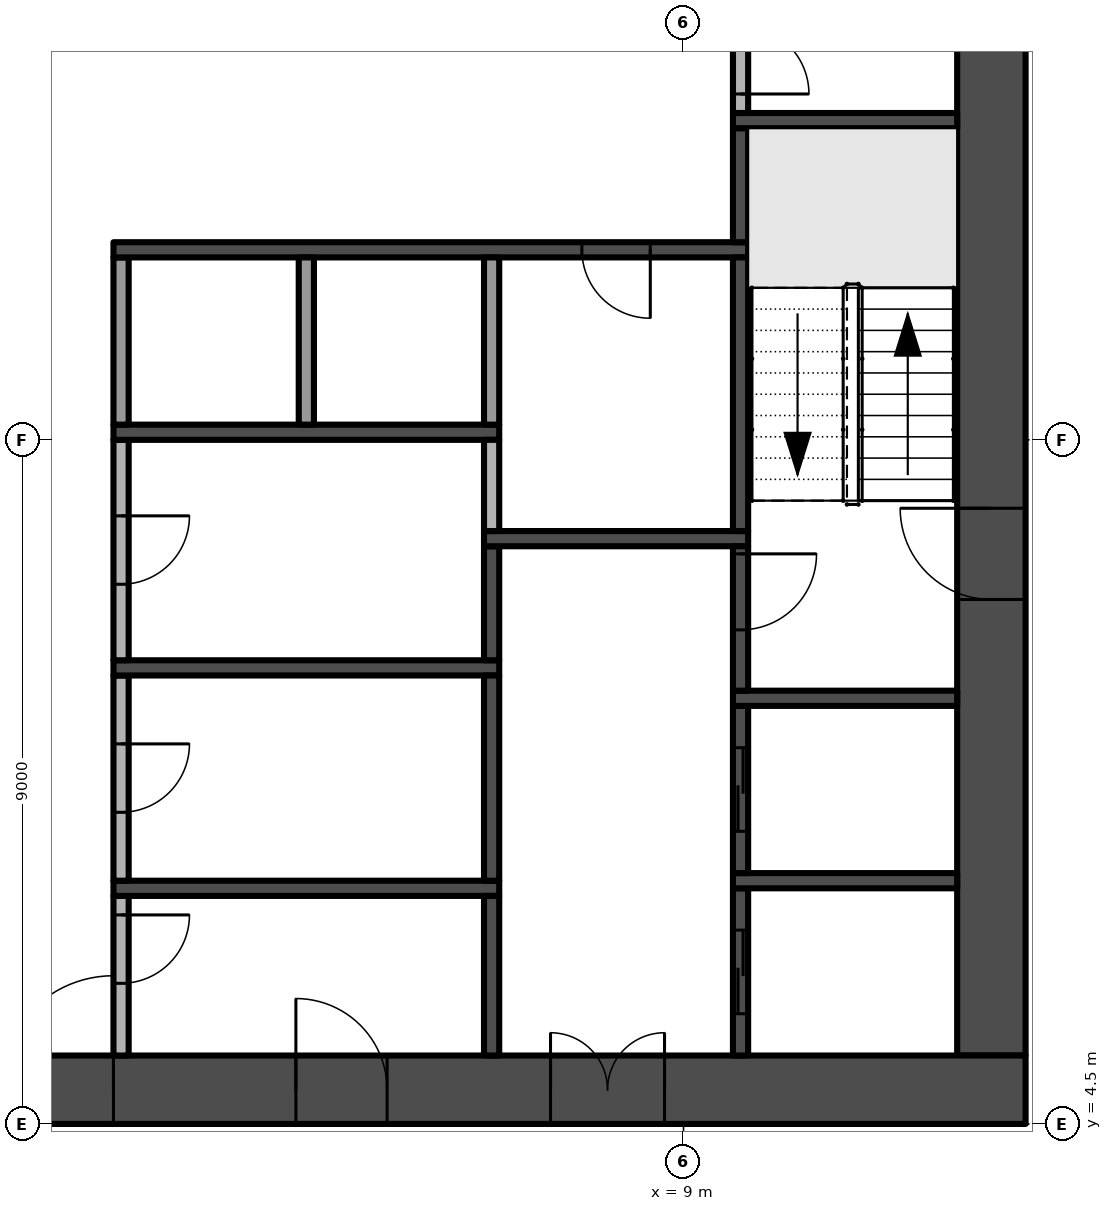
"""IFC4 building model, lengths in metres.
Left out: names, types, materials, properties, quantities, classifications, styles, units other than length and angle.
Written with IfcOpenShell. Run it as: python <this file> out.ifc"""

import sys

from ifc_helpers import new_model, si_unit, direction, frame, frame_2d, origin, place, context, subcontext, project, spatial, rectangle, extrude, element, fill, save


model = new_model("IFC4")
c1 = context("Model", 3, precision=1e-05, world=origin(), true_north=direction((0.0, 1.0)))
c2 = subcontext(c1, "Body", "Model", "MODEL_VIEW")
j1 = project(units=[si_unit("LENGTHUNIT", "METRE"), si_unit("PLANEANGLEUNIT", "RADIAN")], contexts=[c1])
p1 = place(None, origin())
s1 = spatial("IfcSite", under=j1, at=p1, CompositionType="ELEMENT")
p2 = place(p1, origin())
s2 = spatial("IfcBuilding", under=s1, at=p2, CompositionType="ELEMENT")
p3 = place(p2, frame((0.0, 0.0, 80.8)))
s3 = spatial("IfcBuildingStorey", under=s2, at=p3, CompositionType="ELEMENT", Elevation=80.8)
p4 = place(p3, frame((-13.5, 4.95, -0.3), z_axis=(0.0, 0.0, 1.0), x_axis=(1.0, 0.0, 0.0)))
e1 = element("IfcWall", 1, at=p4, inside=s3, PredefinedType="SHEAR", context=c2, shape_type="SweptSolid", body=[
    extrude(rectangle(XDim=27.0, YDim=0.9, at=frame_2d((13.5, 0.0))), origin(), (0.0, 0.0, 1.0), 3.8),
])
p5 = place(p4, frame((12.0, 0.0, 0.3)))
e2 = element("IfcOpeningElement", 2, at=p5, cuts=e1, PredefinedType="OPENING", context=c2, shape_type="SweptSolid", body=[
    extrude(rectangle(XDim=3.0, YDim=2.4, at=frame_2d((1.5, 1.2))), frame((0.0, 0.46, 0.0), z_axis=(0.0, -1.0, 0.0), x_axis=(1.0, 0.0, 0.0)), (0.0, 0.0, 1.0), 0.92),
])
p6 = place(p4, frame((4.9, 0.0, 0.3)))
e3 = element("IfcOpeningElement", 3, at=p6, cuts=e1, PredefinedType="OPENING", context=c2, shape_type="SweptSolid", body=[
    extrude(rectangle(XDim=1.2, YDim=2.2, at=frame_2d((0.6, 1.1))), frame((0.0, 0.46, 0.0), z_axis=(0.0, -1.0, 0.0), x_axis=(1.0, 0.0, 0.0)), (0.0, 0.0, 1.0), 0.92),
])
p7 = place(p4, frame((20.75, 0.0, 0.3)))
e4 = element("IfcOpeningElement", 4, at=p7, cuts=e1, PredefinedType="OPENING", context=c2, shape_type="SweptSolid", body=[
    extrude(rectangle(XDim=1.5, YDim=2.2, at=frame_2d((0.75, 1.1))), frame((0.0, 0.46, 0.0), z_axis=(0.0, -1.0, 0.0), x_axis=(1.0, 0.0, 0.0)), (0.0, 0.0, 1.0), 0.92),
])
p8 = place(p4, frame((17.4, 0.0, 0.3)))
e5 = element("IfcOpeningElement", 5, at=p8, cuts=e1, PredefinedType="OPENING", context=c2, shape_type="SweptSolid", body=[
    extrude(rectangle(XDim=1.2, YDim=2.2, at=frame_2d((0.6, 1.1))), frame((0.0, 0.46, 0.0), z_axis=(0.0, -1.0, 0.0), x_axis=(1.0, 0.0, 0.0)), (0.0, 0.0, 1.0), 0.92),
])
p9 = place(p3, frame((13.05, 5.4, -0.3), z_axis=(0.0, 0.0, 1.0), x_axis=(0.0, 1.0, 0.0)))
e6 = element("IfcWall", 6, at=p9, inside=s3, PredefinedType="SHEAR", context=c2, shape_type="SweptSolid", body=[
    extrude(rectangle(XDim=16.2, YDim=0.9, at=frame_2d((8.1, 0.0))), origin(), (0.0, 0.0, 1.0), 3.8),
])
p10 = place(p9, frame((6.0, 0.0, 0.3)))
e7 = element("IfcOpeningElement", 7, at=p10, cuts=e6, PredefinedType="OPENING", context=c2, shape_type="SweptSolid", body=[
    extrude(rectangle(XDim=1.2, YDim=2.2, at=frame_2d((0.6, 1.1))), frame((0.0, 0.46, 0.0), z_axis=(0.0, -1.0, 0.0), x_axis=(1.0, 0.0, 0.0)), (0.0, 0.0, 1.0), 0.92),
])
p11 = place(p3, frame((1.6, 7.5, 0.0), z_axis=(0.0, 0.0, 1.0), x_axis=(0.0, -1.0, 0.0)))
e8 = element("IfcWall", 8, at=p11, inside=s3, PredefinedType="PARTITIONING", context=c2, shape_type="SweptSolid", body=[
    extrude(rectangle(XDim=2.1, YDim=0.2, at=frame_2d((1.05, 0.0))), origin(), (0.0, 0.0, 1.0), 3.5),
])
p12 = place(p11, frame((0.25, 0.0, 0.0)))
e9 = element("IfcOpeningElement", 9, at=p12, cuts=e8, PredefinedType="OPENING", context=c2, shape_type="SweptSolid", body=[
    extrude(rectangle(XDim=0.9, YDim=2.1, at=frame_2d((0.45, 1.05))), frame((0.0, 0.11, 0.0), z_axis=(0.0, -1.0, 0.0), x_axis=(1.0, 0.0, 0.0)), (0.0, 0.0, 1.0), 0.22),
])
p13 = place(p3, frame((1.5, 7.6, 0.0), z_axis=(0.0, 0.0, 1.0), x_axis=(1.0, 0.0, 0.0)))
e10 = element("IfcWall", 10, at=p13, inside=s3, PredefinedType="SHEAR", context=c2, shape_type="SweptSolid", body=[
    extrude(rectangle(XDim=5.075, YDim=0.2, at=frame_2d((2.538, 0.0))), origin(), (0.0, 0.0, 1.0), 3.5),
])
p14 = place(p3, frame((1.6, 10.4, 0.0), z_axis=(0.0, 0.0, 1.0), x_axis=(0.0, -1.0, 0.0)))
e11 = element("IfcWall", 11, at=p14, inside=s3, PredefinedType="PARTITIONING", context=c2, shape_type="SweptSolid", body=[
    extrude(rectangle(XDim=2.7, YDim=0.2, at=frame_2d((1.35, 0.0))), origin(), (0.0, 0.0, 1.0), 3.5),
])
p15 = place(p14, frame((0.9, 0.0, 0.0)))
e12 = element("IfcOpeningElement", 12, at=p15, cuts=e11, PredefinedType="OPENING", context=c2, shape_type="SweptSolid", body=[
    extrude(rectangle(XDim=0.9, YDim=2.1, at=frame_2d((0.45, 1.05))), frame((0.0, 0.11, 0.0), z_axis=(0.0, -1.0, 0.0), x_axis=(1.0, 0.0, 0.0)), (0.0, 0.0, 1.0), 0.22),
])
p16 = place(p3, frame((1.5, 10.5, 0.0), z_axis=(0.0, 0.0, 1.0), x_axis=(1.0, 0.0, 0.0)))
e13 = element("IfcWall", 13, at=p16, inside=s3, PredefinedType="SHEAR", context=c2, shape_type="SweptSolid", body=[
    extrude(rectangle(XDim=5.075, YDim=0.2, at=frame_2d((2.538, 0.0))), origin(), (0.0, 0.0, 1.0), 3.5),
])
p17 = place(p3, frame((1.6, 13.5, 0.0), z_axis=(0.0, 0.0, 1.0), x_axis=(0.0, -1.0, 0.0)))
e14 = element("IfcWall", 14, at=p17, inside=s3, PredefinedType="PARTITIONING", context=c2, shape_type="SweptSolid", body=[
    extrude(rectangle(XDim=2.9, YDim=0.2, at=frame_2d((1.45, 0.0))), origin(), (0.0, 0.0, 1.0), 3.5),
])
p18 = place(p17, frame((1.0, 0.0, 0.0)))
e15 = element("IfcOpeningElement", 15, at=p18, cuts=e14, PredefinedType="OPENING", context=c2, shape_type="SweptSolid", body=[
    extrude(rectangle(XDim=0.9, YDim=2.1, at=frame_2d((0.45, 1.05))), frame((0.0, 0.11, 0.0), z_axis=(0.0, -1.0, 0.0), x_axis=(1.0, 0.0, 0.0)), (0.0, 0.0, 1.0), 0.22),
])
p19 = place(p3, frame((1.5, 13.6, 0.0), z_axis=(0.0, 0.0, 1.0), x_axis=(1.0, 0.0, 0.0)))
e16 = element("IfcWall", 16, at=p19, inside=s3, PredefinedType="SHEAR", context=c2, shape_type="SweptSolid", body=[
    extrude(rectangle(XDim=5.075, YDim=0.2, at=frame_2d((2.538, 0.0))), origin(), (0.0, 0.0, 1.0), 3.5),
])
p20 = place(p3, frame((1.6, 13.7, 0.0), z_axis=(0.0, 0.0, 1.0), x_axis=(0.0, 1.0, 0.0)))
e17 = element("IfcWall", 17, at=p20, inside=s3, PredefinedType="PARTITIONING", context=c2, shape_type="SweptSolid", body=[
    extrude(rectangle(XDim=2.2, YDim=0.2, at=frame_2d((1.1, 0.0))), origin(), (0.0, 0.0, 1.0), 3.5),
])
p21 = place(p3, frame((9.85, 16.0, 0.0), z_axis=(0.0, 0.0, 1.0), x_axis=(-1.0, 0.0, 0.0)))
e18 = element("IfcWall", 18, at=p21, inside=s3, PredefinedType="SHEAR", context=c2, shape_type="SweptSolid", body=[
    extrude(rectangle(XDim=8.35, YDim=0.2, at=frame_2d((4.175, 0.0))), origin(), (0.0, 0.0, 1.0), 3.5),
])
p22 = place(p21, frame((1.288, 0.0, 0.0)))
e19 = element("IfcOpeningElement", 19, at=p22, cuts=e18, PredefinedType="OPENING", context=c2, shape_type="SweptSolid", body=[
    extrude(rectangle(XDim=0.9, YDim=2.1, at=frame_2d((0.45, 1.05))), frame((0.0, 0.11, 0.0), z_axis=(0.0, -1.0, 0.0), x_axis=(1.0, 0.0, 0.0)), (0.0, 0.0, 1.0), 0.22),
])
p23 = place(p3, frame((4.037, 13.7, 0.0), z_axis=(0.0, 0.0, 1.0), x_axis=(0.0, 1.0, 0.0)))
e20 = element("IfcWall", 20, at=p23, inside=s3, PredefinedType="PARTITIONING", context=c2, shape_type="SweptSolid", body=[
    extrude(rectangle(XDim=2.2, YDim=0.2, at=frame_2d((1.1, 0.0))), origin(), (0.0, 0.0, 1.0), 3.5),
])
p24 = place(p3, frame((6.475, 5.4, 0.0), z_axis=(0.0, 0.0, 1.0), x_axis=(0.0, 1.0, 0.0)))
e21 = element("IfcWall", 21, at=p24, inside=s3, PredefinedType="SHEAR", context=c2, shape_type="SweptSolid", body=[
    extrude(rectangle(XDim=2.1, YDim=0.2, at=frame_2d((1.05, 0.0))), origin(), (0.0, 0.0, 1.0), 3.5),
])
p25 = place(p3, frame((6.475, 7.7, 0.0), z_axis=(0.0, 0.0, 1.0), x_axis=(0.0, 1.0, 0.0)))
e22 = element("IfcWall", 22, at=p25, inside=s3, PredefinedType="SHEAR", context=c2, shape_type="SweptSolid", body=[
    extrude(rectangle(XDim=2.7, YDim=0.2, at=frame_2d((1.35, 0.0))), origin(), (0.0, 0.0, 1.0), 3.5),
])
p26 = place(p3, frame((6.475, 10.6, 0.0), z_axis=(0.0, 0.0, 1.0), x_axis=(0.0, 1.0, 0.0)))
e23 = element("IfcWall", 23, at=p26, inside=s3, PredefinedType="SHEAR", context=c2, shape_type="SweptSolid", body=[
    extrude(rectangle(XDim=1.5, YDim=0.2, at=frame_2d((0.75, 0.0))), origin(), (0.0, 0.0, 1.0), 3.5),
])
p27 = place(p3, frame((6.375, 12.2, 0.0), z_axis=(0.0, 0.0, 1.0), x_axis=(1.0, 0.0, 0.0)))
e24 = element("IfcWall", 24, at=p27, inside=s3, PredefinedType="SHEAR", context=c2, shape_type="SweptSolid", body=[
    extrude(rectangle(XDim=3.475, YDim=0.2, at=frame_2d((1.738, 0.0))), origin(), (0.0, 0.0, 1.0), 3.5),
])
p28 = place(p3, frame((6.475, 12.3, 0.0), z_axis=(0.0, 0.0, 1.0), x_axis=(0.0, 1.0, 0.0)))
e25 = element("IfcWall", 25, at=p28, inside=s3, PredefinedType="PARTITIONING", context=c2, shape_type="SweptSolid", body=[
    extrude(rectangle(XDim=1.2, YDim=0.2, at=frame_2d((0.6, 0.0))), origin(), (0.0, 0.0, 1.0), 3.5),
])
p29 = place(p3, frame((6.475, 13.7, 0.0), z_axis=(0.0, 0.0, 1.0), x_axis=(0.0, 1.0, 0.0)))
e26 = element("IfcWall", 26, at=p29, inside=s3, PredefinedType="PARTITIONING", context=c2, shape_type="SweptSolid", body=[
    extrude(rectangle(XDim=2.2, YDim=0.2, at=frame_2d((1.1, 0.0))), origin(), (0.0, 0.0, 1.0), 3.5),
])
p30 = place(p3, frame((9.75, 5.4, 0.0), z_axis=(0.0, 0.0, 1.0), x_axis=(0.0, 1.0, 0.0)))
e27 = element("IfcWall", 27, at=p30, inside=s3, PredefinedType="SHEAR", context=c2, shape_type="SweptSolid", body=[
    extrude(rectangle(XDim=2.2, YDim=0.2, at=frame_2d((1.1, 0.0))), origin(), (0.0, 0.0, 1.0), 3.5),
])
p31 = place(p30, frame((0.55, 0.0, 0.0)))
e28 = element("IfcOpeningElement", 28, at=p31, cuts=e27, PredefinedType="OPENING", context=c2, shape_type="SweptSolid", body=[
    extrude(rectangle(XDim=1.1, YDim=2.1, at=frame_2d((0.55, 1.05))), frame((0.0, 0.11, 0.0), z_axis=(0.0, -1.0, 0.0), x_axis=(1.0, 0.0, 0.0)), (0.0, 0.0, 1.0), 0.22),
])
p32 = place(p3, frame((9.65, 7.7, 0.0), z_axis=(0.0, 0.0, 1.0), x_axis=(1.0, 0.0, 0.0)))
e29 = element("IfcWall", 29, at=p32, inside=s3, PredefinedType="SHEAR", context=c2, shape_type="SweptSolid", body=[
    extrude(rectangle(XDim=2.95, YDim=0.2, at=frame_2d((1.475, 0.0))), origin(), (0.0, 0.0, 1.0), 3.5),
])
p33 = place(p3, frame((9.75, 7.8, 0.0), z_axis=(0.0, 0.0, 1.0), x_axis=(0.0, 1.0, 0.0)))
e30 = element("IfcWall", 30, at=p33, inside=s3, PredefinedType="SHEAR", context=c2, shape_type="SweptSolid", body=[
    extrude(rectangle(XDim=2.2, YDim=0.2, at=frame_2d((1.1, 0.0))), origin(), (0.0, 0.0, 1.0), 3.5),
])
p34 = place(p33, frame((0.55, 0.0, 0.0)))
e31 = element("IfcOpeningElement", 31, at=p34, cuts=e30, PredefinedType="OPENING", context=c2, shape_type="SweptSolid", body=[
    extrude(rectangle(XDim=1.1, YDim=2.1, at=frame_2d((0.55, 1.05))), frame((0.0, 0.11, 0.0), z_axis=(0.0, -1.0, 0.0), x_axis=(1.0, 0.0, 0.0)), (0.0, 0.0, 1.0), 0.22),
])
p35 = place(p3, frame((9.65, 10.1, 0.0), z_axis=(0.0, 0.0, 1.0), x_axis=(1.0, 0.0, 0.0)))
e32 = element("IfcWall", 32, at=p35, inside=s3, PredefinedType="SHEAR", context=c2, shape_type="SweptSolid", body=[
    extrude(rectangle(XDim=2.95, YDim=0.2, at=frame_2d((1.475, 0.0))), origin(), (0.0, 0.0, 1.0), 3.5),
])
p36 = place(p3, frame((9.75, 12.1, 0.0), z_axis=(0.0, 0.0, 1.0), x_axis=(0.0, -1.0, 0.0)))
e33 = element("IfcWall", 33, at=p36, inside=s3, PredefinedType="SHEAR", context=c2, shape_type="SweptSolid", body=[
    extrude(rectangle(XDim=1.9, YDim=0.2, at=frame_2d((0.95, 0.0))), origin(), (0.0, 0.0, 1.0), 3.5),
])
p37 = place(p36, frame((0.1, 0.0, 0.0)))
e34 = element("IfcOpeningElement", 34, at=p37, cuts=e33, PredefinedType="OPENING", context=c2, shape_type="SweptSolid", body=[
    extrude(rectangle(XDim=1.0, YDim=2.2, at=frame_2d((0.5, 1.1))), frame((0.0, 0.11, 0.0), z_axis=(0.0, -1.0, 0.0), x_axis=(1.0, 0.0, 0.0)), (0.0, 0.0, 1.0), 0.22),
])
p38 = place(p3, frame((9.75, 12.3, 0.0), z_axis=(0.0, 0.0, 1.0), x_axis=(0.0, 1.0, 0.0)))
e35 = element("IfcWall", 35, at=p38, inside=s3, PredefinedType="SHEAR", context=c2, shape_type="SweptSolid", body=[
    extrude(rectangle(XDim=3.6, YDim=0.2, at=frame_2d((1.8, 0.0))), origin(), (0.0, 0.0, 1.0), 3.5),
])
p39 = place(p3, frame((9.75, 16.1, 0.0), z_axis=(0.0, 0.0, 1.0), x_axis=(0.0, 1.0, 0.0)))
e36 = element("IfcWall", 36, at=p39, inside=s3, PredefinedType="SHEAR", context=c2, shape_type="SweptSolid", body=[
    extrude(rectangle(XDim=1.5, YDim=0.2, at=frame_2d((0.75, 0.0))), origin(), (0.0, 0.0, 1.0), 3.5),
])
p40 = place(p3, frame((9.65, 17.7, 0.0), z_axis=(0.0, 0.0, 1.0), x_axis=(1.0, 0.0, 0.0)))
e37 = element("IfcWall", 37, at=p40, inside=s3, PredefinedType="SHEAR", context=c2, shape_type="SweptSolid", body=[
    extrude(rectangle(XDim=2.95, YDim=0.2, at=frame_2d((1.475, 0.0))), origin(), (0.0, 0.0, 1.0), 3.5),
])
p41 = place(p3, frame((9.75, 19.2, 0.0), z_axis=(0.0, 0.0, 1.0), x_axis=(0.0, -1.0, 0.0)))
e38 = element("IfcWall", 38, at=p41, inside=s3, PredefinedType="PARTITIONING", context=c2, shape_type="SweptSolid", body=[
    extrude(rectangle(XDim=1.4, YDim=0.2, at=frame_2d((0.7, 0.0))), origin(), (0.0, 0.0, 1.0), 3.5),
])
p42 = place(p41, frame((0.25, 0.0, 0.0)))
e39 = element("IfcOpeningElement", 39, at=p42, cuts=e38, PredefinedType="OPENING", context=c2, shape_type="SweptSolid", body=[
    extrude(rectangle(XDim=0.9, YDim=2.1, at=frame_2d((0.45, 1.05))), frame((0.0, 0.11, 0.0), z_axis=(0.0, -1.0, 0.0), x_axis=(1.0, 0.0, 0.0)), (0.0, 0.0, 1.0), 0.22),
])
p43 = place(p5, frame((3.0, 0.0, 0.0), z_axis=(0.0, 0.0, 1.0), x_axis=(-1.0, 0.0, 0.0)))
e40 = element("IfcDoor", 40, at=p43, inside=s3, OperationType="DOUBLE_DOOR_SINGLE_SWING", PredefinedType="DOOR", context=c2, shape_type="SweptSolid", body=[
    extrude(rectangle(XDim=3.0, YDim=2.4, at=frame_2d((1.5, 1.2))), frame((0.0, 0.025, 0.0), z_axis=(0.0, -1.0, 0.0), x_axis=(1.0, 0.0, 0.0)), (0.0, 0.0, 1.0), 0.05),
])
fill(e2, e40)
p44 = place(p10, frame((1.2, 0.0, 0.0), z_axis=(0.0, 0.0, 1.0), x_axis=(-1.0, 0.0, 0.0)))
e41 = element("IfcDoor", 41, at=p44, inside=s3, OperationType="SINGLE_SWING_LEFT", PredefinedType="DOOR", context=c2, shape_type="SweptSolid", body=[
    extrude(rectangle(XDim=1.2, YDim=2.2, at=frame_2d((0.6, 1.1))), frame((0.0, 0.025, 0.0), z_axis=(0.0, -1.0, 0.0), x_axis=(1.0, 0.0, 0.0)), (0.0, 0.0, 1.0), 0.05),
])
fill(e7, e41)
p45 = place(p7, frame((1.5, 0.0, 0.0), z_axis=(0.0, 0.0, 1.0), x_axis=(-1.0, 0.0, 0.0)))
e42 = element("IfcDoor", 42, at=p45, inside=s3, OperationType="DOUBLE_DOOR_SINGLE_SWING", PredefinedType="DOOR", context=c2, shape_type="SweptSolid", body=[
    extrude(rectangle(XDim=1.5, YDim=2.2, at=frame_2d((0.75, 1.1))), frame((0.0, 0.025, 0.0), z_axis=(0.0, -1.0, 0.0), x_axis=(1.0, 0.0, 0.0)), (0.0, 0.0, 1.0), 0.05),
])
fill(e4, e42)
p46 = place(p8, frame((1.2, 0.0, 0.0), z_axis=(0.0, 0.0, 1.0), x_axis=(-1.0, 0.0, 0.0)))
e43 = element("IfcDoor", 43, at=p46, inside=s3, OperationType="SINGLE_SWING_RIGHT", PredefinedType="DOOR", context=c2, shape_type="SweptSolid", body=[
    extrude(rectangle(XDim=1.2, YDim=2.2, at=frame_2d((0.6, 1.1))), frame((0.0, 0.025, 0.0), z_axis=(0.0, -1.0, 0.0), x_axis=(1.0, 0.0, 0.0)), (0.0, 0.0, 1.0), 0.05),
])
fill(e5, e43)
p47 = place(p37, origin())
e44 = element("IfcDoor", 44, at=p47, inside=s3, OperationType="SINGLE_SWING_LEFT", PredefinedType="DOOR", context=c2, shape_type="SweptSolid", body=[
    extrude(rectangle(XDim=1.0, YDim=2.2, at=frame_2d((0.5, 1.1))), frame((0.0, 0.025, 0.0), z_axis=(0.0, -1.0, 0.0), x_axis=(1.0, 0.0, 0.0)), (0.0, 0.0, 1.0), 0.05),
])
fill(e34, e44)
p48 = place(p31, origin())
e45 = element("IfcDoor", 45, at=p48, inside=s3, OperationType="SLIDING_TO_RIGHT", PredefinedType="DOOR", context=c2, shape_type="SweptSolid", body=[
    extrude(rectangle(XDim=1.1, YDim=2.1, at=frame_2d((0.55, 1.05))), frame((0.0, 0.025, 0.0), z_axis=(0.0, -1.0, 0.0), x_axis=(1.0, 0.0, 0.0)), (0.0, 0.0, 1.0), 0.05),
])
fill(e28, e45)
p49 = place(p34, origin())
e46 = element("IfcDoor", 46, at=p49, inside=s3, OperationType="SLIDING_TO_RIGHT", PredefinedType="DOOR", context=c2, shape_type="SweptSolid", body=[
    extrude(rectangle(XDim=1.1, YDim=2.1, at=frame_2d((0.55, 1.05))), frame((0.0, 0.025, 0.0), z_axis=(0.0, -1.0, 0.0), x_axis=(1.0, 0.0, 0.0)), (0.0, 0.0, 1.0), 0.05),
])
fill(e31, e46)
p50 = place(p12, origin())
e47 = element("IfcDoor", 47, at=p50, inside=s3, OperationType="SINGLE_SWING_LEFT", PredefinedType="DOOR", context=c2, shape_type="SweptSolid", body=[
    extrude(rectangle(XDim=0.9, YDim=2.1, at=frame_2d((0.45, 1.05))), frame((0.0, 0.025, 0.0), z_axis=(0.0, -1.0, 0.0), x_axis=(1.0, 0.0, 0.0)), (0.0, 0.0, 1.0), 0.05),
])
fill(e9, e47)
p51 = place(p15, origin())
e48 = element("IfcDoor", 48, at=p51, inside=s3, OperationType="SINGLE_SWING_LEFT", PredefinedType="DOOR", context=c2, shape_type="SweptSolid", body=[
    extrude(rectangle(XDim=0.9, YDim=2.1, at=frame_2d((0.45, 1.05))), frame((0.0, 0.025, 0.0), z_axis=(0.0, -1.0, 0.0), x_axis=(1.0, 0.0, 0.0)), (0.0, 0.0, 1.0), 0.05),
])
fill(e12, e48)
p52 = place(p18, origin())
e49 = element("IfcDoor", 49, at=p52, inside=s3, OperationType="SINGLE_SWING_LEFT", PredefinedType="DOOR", context=c2, shape_type="SweptSolid", body=[
    extrude(rectangle(XDim=0.9, YDim=2.1, at=frame_2d((0.45, 1.05))), frame((0.0, 0.025, 0.0), z_axis=(0.0, -1.0, 0.0), x_axis=(1.0, 0.0, 0.0)), (0.0, 0.0, 1.0), 0.05),
])
fill(e15, e49)
p53 = place(p22, origin())
e50 = element("IfcDoor", 50, at=p53, inside=s3, OperationType="SINGLE_SWING_LEFT", PredefinedType="DOOR", context=c2, shape_type="SweptSolid", body=[
    extrude(rectangle(XDim=0.9, YDim=2.1, at=frame_2d((0.45, 1.05))), frame((0.0, 0.025, 0.0), z_axis=(0.0, -1.0, 0.0), x_axis=(1.0, 0.0, 0.0)), (0.0, 0.0, 1.0), 0.05),
])
fill(e19, e50)
p54 = place(p42, origin())
e51 = element("IfcDoor", 51, at=p54, inside=s3, OperationType="SINGLE_SWING_RIGHT", PredefinedType="DOOR", context=c2, shape_type="SweptSolid", body=[
    extrude(rectangle(XDim=0.9, YDim=2.1, at=frame_2d((0.45, 1.05))), frame((0.0, 0.025, 0.0), z_axis=(0.0, -1.0, 0.0), x_axis=(1.0, 0.0, 0.0)), (0.0, 0.0, 1.0), 0.05),
])
fill(e39, e51)
save(model, sys.argv[1])
